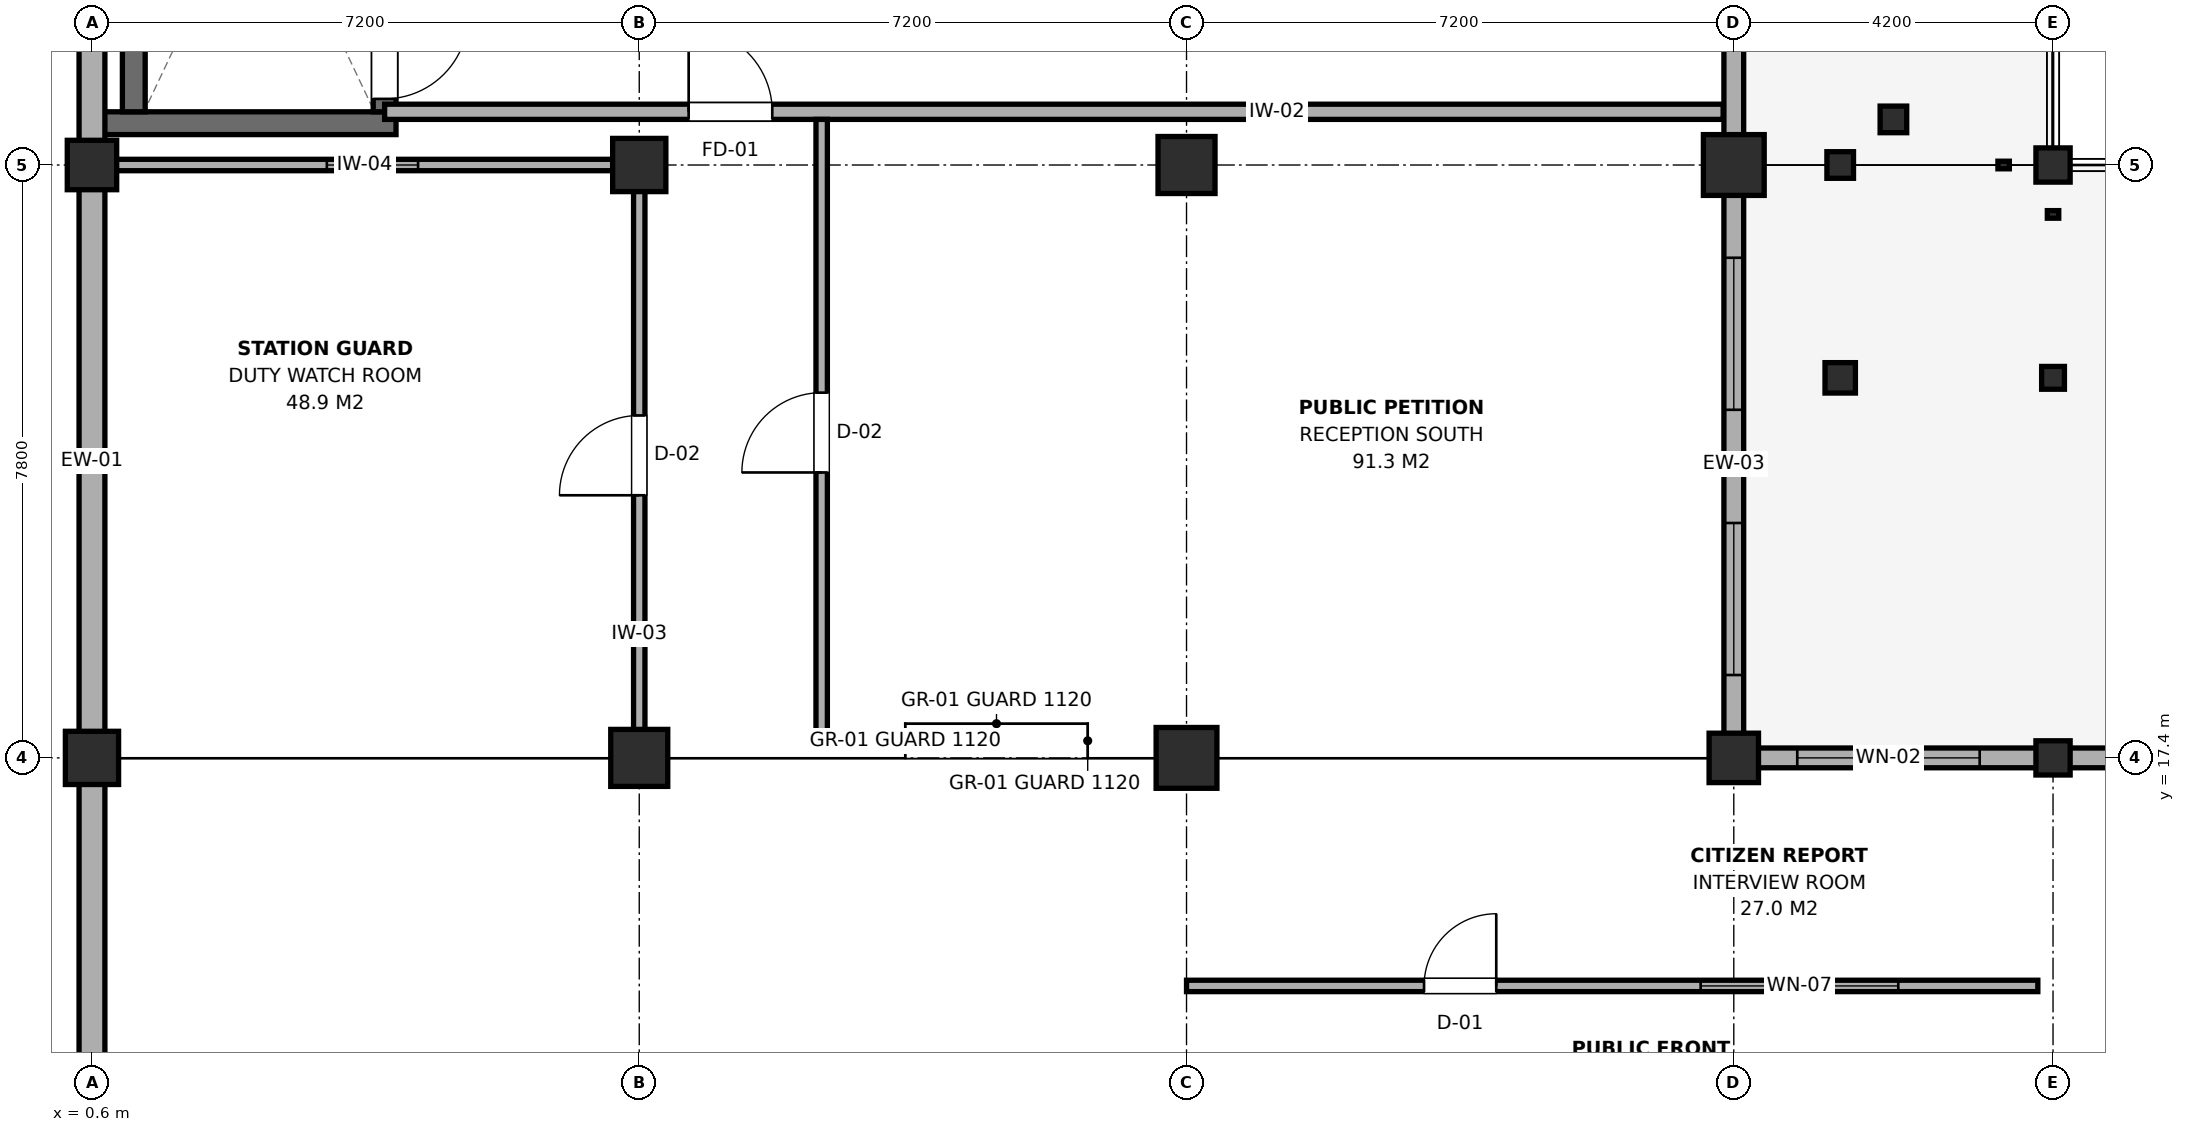
"""IFC4 building model, lengths in metres.
Left out: names, types, materials, properties, quantities, classifications, styles, units other than length and angle.
Written with IfcOpenShell. Run it as: python <this file> out.ifc"""

import sys

from ifc_helpers import new_model, si_unit, direction, frame, frame_2d, origin, origin_2d, place, context, subcontext, project, spatial, rectangle, hollow_rectangle, extrude, element, fill, save


model = new_model("IFC4")
c1 = context("Model", 3, precision=1e-05, world=origin(), true_north=direction((0.0, 1.0)))
c2 = subcontext(c1, "Body", "Model", "MODEL_VIEW")
j1 = project(units=[si_unit("LENGTHUNIT", "METRE"), si_unit("PLANEANGLEUNIT", "RADIAN")], contexts=[c1])
p1 = place(None, origin())
s1 = spatial("IfcSite", under=j1, at=p1, CompositionType="ELEMENT")
p2 = place(p1, origin())
s2 = spatial("IfcBuilding", under=s1, at=p2, CompositionType="ELEMENT")
p3 = place(p2, origin())
s3 = spatial("IfcBuildingStorey", under=s2, at=p3, CompositionType="ELEMENT", Elevation=0.0)
p4 = place(p3, frame((0.6, 17.4, 0.0), z_axis=(0.0, 0.0, 1.0), x_axis=(1.0, 0.0, 0.0)))
e1 = element("IfcColumn", 1, at=p4, inside=s3, PredefinedType="COLUMN", context=c2, shape_type="SweptSolid", body=[
    extrude(rectangle(XDim=0.7, YDim=0.7, at=origin_2d()), origin(), (0.0, 0.0, 1.0), 4.8),
])
p5 = place(p3, frame((0.6, 25.2, 0.0), z_axis=(0.0, 0.0, 1.0), x_axis=(1.0, 0.0, 0.0)))
e2 = element("IfcColumn", 2, at=p5, inside=s3, PredefinedType="COLUMN", context=c2, shape_type="SweptSolid", body=[
    extrude(rectangle(XDim=0.65, YDim=0.65, at=origin_2d()), origin(), (0.0, 0.0, 1.0), 4.8),
])
p6 = place(p3, frame((7.8, 17.4, 0.0), z_axis=(0.0, 0.0, 1.0), x_axis=(1.0, 0.0, 0.0)))
e3 = element("IfcColumn", 3, at=p6, inside=s3, PredefinedType="COLUMN", context=c2, shape_type="SweptSolid", body=[
    extrude(rectangle(XDim=0.75, YDim=0.75, at=origin_2d()), origin(), (0.0, 0.0, 1.0), 4.8),
])
p7 = place(p3, frame((7.8, 25.2, 0.0), z_axis=(0.0, 0.0, 1.0), x_axis=(1.0, 0.0, 0.0)))
e4 = element("IfcColumn", 4, at=p7, inside=s3, PredefinedType="COLUMN", context=c2, shape_type="SweptSolid", body=[
    extrude(rectangle(XDim=0.7, YDim=0.7, at=origin_2d()), origin(), (0.0, 0.0, 1.0), 4.8),
])
p8 = place(p3, frame((15.0, 17.4, 0.0), z_axis=(0.0, 0.0, 1.0), x_axis=(1.0, 0.0, 0.0)))
e5 = element("IfcColumn", 5, at=p8, inside=s3, PredefinedType="COLUMN", context=c2, shape_type="SweptSolid", body=[
    extrude(rectangle(XDim=0.8, YDim=0.8, at=origin_2d()), origin(), (0.0, 0.0, 1.0), 4.8),
])
p9 = place(p3, frame((15.0, 25.2, 0.0), z_axis=(0.0, 0.0, 1.0), x_axis=(1.0, 0.0, 0.0)))
e6 = element("IfcColumn", 6, at=p9, inside=s3, PredefinedType="COLUMN", context=c2, shape_type="SweptSolid", body=[
    extrude(rectangle(XDim=0.75, YDim=0.75, at=origin_2d()), origin(), (0.0, 0.0, 1.0), 4.8),
])
p10 = place(p3, frame((22.2, 17.4, 0.0), z_axis=(0.0, 0.0, 1.0), x_axis=(1.0, 0.0, 0.0)))
e7 = element("IfcColumn", 7, at=p10, inside=s3, PredefinedType="COLUMN", context=c2, shape_type="SweptSolid", body=[
    extrude(rectangle(XDim=0.65, YDim=0.65, at=origin_2d()), origin(), (0.0, 0.0, 1.0), 4.8),
])
p11 = place(p3, frame((22.2, 25.2, 0.0), z_axis=(0.0, 0.0, 1.0), x_axis=(1.0, 0.0, 0.0)))
e8 = element("IfcColumn", 8, at=p11, inside=s3, PredefinedType="COLUMN", context=c2, shape_type="SweptSolid", body=[
    extrude(rectangle(XDim=0.8, YDim=0.8, at=origin_2d()), origin(), (0.0, 0.0, 1.0), 4.8),
])
p12 = place(p3, frame((23.6, 22.4, 0.0), z_axis=(0.0, 0.0, 1.0), x_axis=(1.0, 0.0, 0.0)))
e9 = element("IfcColumn", 9, at=p12, inside=s3, PredefinedType="COLUMN", context=c2, shape_type="SweptSolid", body=[
    extrude(hollow_rectangle(XDim=0.4, YDim=0.4, WallThickness=0.02, at=origin_2d()), origin(), (0.0, 0.0, 1.0), 4.8),
])
for number, where, z_axis, x_axis in (
    (10, (23.6, 25.2, 0.0), (0.0, 0.0, 1.0), (1.0, 0.0, 0.0)),
    (11, (24.3, 25.8, 0.0), (0.0, 0.0, 1.0), (1.0, 0.0, 0.0)),
):
    element("IfcColumn", number, at=place(p3, frame(where, z_axis=z_axis, x_axis=x_axis)), inside=s3, PredefinedType="COLUMN", context=c2, shape_type="SweptSolid", body=[
        extrude(hollow_rectangle(XDim=0.35, YDim=0.35, WallThickness=0.016, at=origin_2d()), origin(), (0.0, 0.0, 1.0), 4.8),
    ])
p13 = place(p3, frame((26.4, 17.4, 0.0), z_axis=(0.0, 0.0, 1.0), x_axis=(1.0, 0.0, 0.0)))
e12 = element("IfcColumn", 12, at=p13, inside=s3, PredefinedType="COLUMN", context=c2, shape_type="SweptSolid", body=[
    extrude(rectangle(XDim=0.45, YDim=0.45, at=origin_2d()), origin(), (0.0, 0.0, 1.0), 4.8),
])
p14 = place(p3, frame((26.4, 22.4, 0.0), z_axis=(0.0, 0.0, 1.0), x_axis=(1.0, 0.0, 0.0)))
e13 = element("IfcColumn", 13, at=p14, inside=s3, PredefinedType="COLUMN", context=c2, shape_type="SweptSolid", body=[
    extrude(hollow_rectangle(XDim=0.3, YDim=0.3, WallThickness=0.016, at=origin_2d()), origin(), (0.0, 0.0, 1.0), 4.8),
])
p15 = place(p3, frame((26.4, 25.2, 0.0), z_axis=(0.0, 0.0, 1.0), x_axis=(1.0, 0.0, 0.0)))
e14 = element("IfcColumn", 14, at=p15, inside=s3, PredefinedType="COLUMN", context=c2, shape_type="SweptSolid", body=[
    extrude(rectangle(XDim=0.45, YDim=0.45, at=origin_2d()), origin(), (0.0, 0.0, 1.0), 4.8),
])
p16 = place(p3, frame((0.75, 25.75, 0.0), z_axis=(0.0, 0.0, 1.0), x_axis=(1.0, 0.0, 0.0)))
e15 = element("IfcWall", 15, at=p16, inside=s3, PredefinedType="SHEAR", context=c2, shape_type="SweptSolid", body=[
    extrude(rectangle(XDim=3.85, YDim=0.3, at=frame_2d((1.925, 0.0))), origin(), (0.0, 0.0, 1.0), 4.56),
])
p17 = place(p3, frame((1.15, 25.9, 0.0), z_axis=(0.0, 0.0, 1.0), x_axis=(0.0, 1.0, 0.0)))
e16 = element("IfcWall", 16, at=p17, inside=s3, PredefinedType="SHEAR", context=c2, shape_type="SweptSolid", body=[
    extrude(rectangle(XDim=6.4, YDim=0.3, at=frame_2d((3.2, 0.0))), origin(), (0.0, 0.0, 1.0), 4.56),
])
p18 = place(p3, frame((4.45, 25.9, 0.0), z_axis=(0.0, 0.0, 1.0), x_axis=(0.0, 1.0, 0.0)))
e17 = element("IfcWall", 17, at=p18, inside=s3, PredefinedType="SHEAR", context=c2, shape_type="SweptSolid", body=[
    extrude(rectangle(XDim=6.4, YDim=0.3, at=frame_2d((3.2, 0.0))), origin(), (0.0, 0.0, 1.0), 4.56),
])
p19 = place(p18, frame((0.17, 0.0, 0.0)))
e18 = element("IfcOpeningElement", 18, at=p19, cuts=e17, PredefinedType="OPENING", context=c2, shape_type="SweptSolid", body=[
    extrude(rectangle(XDim=1.1, YDim=2.15, at=frame_2d((0.55, 1.075))), frame((0.0, 0.165, 0.0), z_axis=(0.0, -1.0, 0.0), x_axis=(1.0, 0.0, 0.0)), (0.0, 0.0, 1.0), 0.33),
])
p20 = place(p3, frame((22.07, 17.4, 0.0), z_axis=(0.0, 0.0, 1.0), x_axis=(1.0, 0.0, 0.0)))
e19 = element("IfcWall", 19, at=p20, inside=s3, PredefinedType="SOLIDWALL", context=c2, shape_type="SweptSolid", body=[
    extrude(rectangle(XDim=4.33, YDim=0.26, at=frame_2d((2.165, 0.0))), origin(), (0.0, 0.0, 1.0), 3.955),
])
p21 = place(p20, frame((0.965, 0.0, 0.9)))
e20 = element("IfcOpeningElement", 20, at=p21, cuts=e19, PredefinedType="OPENING", context=c2, shape_type="SweptSolid", body=[
    extrude(rectangle(XDim=2.4, YDim=2.1, at=frame_2d((1.2, 1.05))), frame((0.0, 0.145, 0.0), z_axis=(0.0, -1.0, 0.0), x_axis=(1.0, 0.0, 0.0)), (0.0, 0.0, 1.0), 0.29),
])
p22 = place(p3, frame((26.4, 17.4, 0.0), z_axis=(0.0, 0.0, 1.0), x_axis=(1.0, 0.0, 0.0)))
e21 = element("IfcWall", 21, at=p22, inside=s3, PredefinedType="SOLIDWALL", context=c2, shape_type="SweptSolid", body=[
    extrude(rectangle(XDim=7.8, YDim=0.26, at=frame_2d((3.9, 0.0))), origin(), (0.0, 0.0, 1.0), 3.955),
])
p23 = place(p22, frame((1.184, 0.0, 0.9)))
e22 = element("IfcOpeningElement", 22, at=p23, cuts=e21, PredefinedType="OPENING", context=c2, shape_type="SweptSolid", body=[
    extrude(rectangle(XDim=2.0, YDim=1.8, at=frame_2d((1.0, 0.9))), frame((0.0, 0.145, 0.0), z_axis=(0.0, -1.0, 0.0), x_axis=(1.0, 0.0, 0.0)), (0.0, 0.0, 1.0), 0.29),
])
p24 = place(p22, frame((4.616, 0.0, 0.9)))
e23 = element("IfcOpeningElement", 23, at=p24, cuts=e21, PredefinedType="OPENING", context=c2, shape_type="SweptSolid", body=[
    extrude(rectangle(XDim=2.0, YDim=1.8, at=frame_2d((1.0, 0.9))), frame((0.0, 0.145, 0.0), z_axis=(0.0, -1.0, 0.0), x_axis=(1.0, 0.0, 0.0)), (0.0, 0.0, 1.0), 0.29),
])
p25 = place(p3, frame((0.6, 12.0, 0.0), z_axis=(0.0, 0.0, 1.0), x_axis=(0.0, 1.0, 0.0)))
e24 = element("IfcWall", 24, at=p25, inside=s3, PredefinedType="SOLIDWALL", context=c2, shape_type="SweptSolid", body=[
    extrude(rectangle(XDim=5.57, YDim=0.34, at=frame_2d((2.785, 0.0))), origin(), (0.0, 0.0, 1.0), 3.955),
])
p26 = place(p3, frame((0.6, 17.23, 0.0), z_axis=(0.0, 0.0, 1.0), x_axis=(0.0, 1.0, 0.0)))
e25 = element("IfcWall", 25, at=p26, inside=s3, PredefinedType="SOLIDWALL", context=c2, shape_type="SweptSolid", body=[
    extrude(rectangle(XDim=7.97, YDim=0.34, at=frame_2d((3.985, 0.0))), origin(), (0.0, 0.0, 1.0), 3.955),
])
p27 = place(p3, frame((0.6, 25.2, 0.0), z_axis=(0.0, 0.0, 1.0), x_axis=(0.0, 1.0, 0.0)))
e26 = element("IfcWall", 26, at=p27, inside=s3, PredefinedType="SOLIDWALL", context=c2, shape_type="SweptSolid", body=[
    extrude(rectangle(XDim=5.6, YDim=0.34, at=frame_2d((2.8, 0.0))), origin(), (0.0, 0.0, 1.0), 4.005),
])
p28 = place(p3, frame((22.2, 17.27, 0.0), z_axis=(0.0, 0.0, 1.0), x_axis=(0.0, 1.0, 0.0)))
e27 = element("IfcWall", 27, at=p28, inside=s3, PredefinedType="SOLIDWALL", context=c2, shape_type="SweptSolid", body=[
    extrude(rectangle(XDim=7.93, YDim=0.26, at=frame_2d((3.965, 0.0))), origin(), (0.0, 0.0, 1.0), 3.955),
])
p29 = place(p28, frame((1.22, 0.0, 0.9)))
e28 = element("IfcOpeningElement", 28, at=p29, cuts=e27, PredefinedType="OPENING", context=c2, shape_type="SweptSolid", body=[
    extrude(rectangle(XDim=2.0, YDim=1.8, at=frame_2d((1.0, 0.9))), frame((0.0, 0.145, 0.0), z_axis=(0.0, -1.0, 0.0), x_axis=(1.0, 0.0, 0.0)), (0.0, 0.0, 1.0), 0.29),
])
p30 = place(p28, frame((4.71, 0.0, 0.9)))
e29 = element("IfcOpeningElement", 29, at=p30, cuts=e27, PredefinedType="OPENING", context=c2, shape_type="SweptSolid", body=[
    extrude(rectangle(XDim=2.0, YDim=1.8, at=frame_2d((1.0, 0.9))), frame((0.0, 0.145, 0.0), z_axis=(0.0, -1.0, 0.0), x_axis=(1.0, 0.0, 0.0)), (0.0, 0.0, 1.0), 0.29),
])
p31 = place(p3, frame((22.2, 25.2, 0.0), z_axis=(0.0, 0.0, 1.0), x_axis=(0.0, 1.0, 0.0)))
e30 = element("IfcWall", 30, at=p31, inside=s3, PredefinedType="SOLIDWALL", context=c2, shape_type="SweptSolid", body=[
    extrude(rectangle(XDim=5.6, YDim=0.26, at=frame_2d((2.8, 0.0))), origin(), (0.0, 0.0, 1.0), 4.005),
])
p32 = place(p31, frame((1.8, 0.0, 0.0)))
e31 = element("IfcOpeningElement", 31, at=p32, cuts=e30, PredefinedType="OPENING", context=c2, shape_type="SweptSolid", body=[
    extrude(rectangle(XDim=2.0, YDim=2.25, at=frame_2d((1.0, 1.125))), frame((0.0, 0.145, 0.0), z_axis=(0.0, -1.0, 0.0), x_axis=(1.0, 0.0, 0.0)), (0.0, 0.0, 1.0), 0.29),
])
for number, where, z_axis, x_axis in (
    (32, (26.4, 24.55, 0.0), (0.0, 0.0, 1.0), (1.0, 0.0, 0.0)),
    (33, (25.75, 25.2, 0.0), (0.0, 0.0, 1.0), (1.0, 0.0, 0.0)),
):
    element("IfcColumn", number, at=place(p3, frame(where, z_axis=z_axis, x_axis=x_axis)), inside=s3, PredefinedType="COLUMN", context=c2, shape_type="SweptSolid", body=[
        extrude(hollow_rectangle(XDim=0.15, YDim=0.1, WallThickness=0.008, at=origin_2d()), origin(), (0.0, 0.0, 1.0), 4.8),
    ])
p33 = place(p3, frame((4.45, 25.9, 0.0), z_axis=(0.0, 0.0, 1.0), x_axis=(1.0, 0.0, 0.0)))
e34 = element("IfcWall", 34, at=p33, inside=s3, PredefinedType="PARTITIONING", context=c2, shape_type="SweptSolid", body=[
    extrude(rectangle(XDim=17.61, YDim=0.2, at=frame_2d((8.805, 0.0))), origin(), (0.0, 0.0, 1.0), 4.005),
])
p34 = place(p33, frame((4.0, 0.0, 0.0)))
e35 = element("IfcOpeningElement", 35, at=p34, cuts=e34, PredefinedType="OPENING", context=c2, shape_type="SweptSolid", body=[
    extrude(rectangle(XDim=1.1, YDim=2.15, at=frame_2d((0.55, 1.075))), frame((0.0, 0.115, 0.0), z_axis=(0.0, -1.0, 0.0), x_axis=(1.0, 0.0, 0.0)), (0.0, 0.0, 1.0), 0.23),
])
p35 = place(p3, frame((15.0, 14.4, 0.0), z_axis=(0.0, 0.0, 1.0), x_axis=(1.0, 0.0, 0.0)))
e36 = element("IfcWall", 36, at=p35, inside=s3, PredefinedType="PARTITIONING", context=c2, shape_type="SweptSolid", body=[
    extrude(rectangle(XDim=11.2, YDim=0.15, at=frame_2d((5.6, 0.0))), origin(), (0.0, 0.0, 1.0), 4.055),
])
p36 = place(p35, frame((3.125, 0.0, 0.0)))
e37 = element("IfcOpeningElement", 37, at=p36, cuts=e36, PredefinedType="OPENING", context=c2, shape_type="SweptSolid", body=[
    extrude(rectangle(XDim=0.95, YDim=2.15, at=frame_2d((0.475, 1.075))), frame((0.0, 0.09, 0.0), z_axis=(0.0, -1.0, 0.0), x_axis=(1.0, 0.0, 0.0)), (0.0, 0.0, 1.0), 0.18),
])
p37 = place(p35, frame((6.764, 0.0, 0.95)))
e38 = element("IfcOpeningElement", 38, at=p37, cuts=e36, PredefinedType="OPENING", context=c2, shape_type="SweptSolid", body=[
    extrude(rectangle(XDim=2.6, YDim=1.5, at=frame_2d((1.3, 0.75))), frame((0.0, 0.09, 0.0), z_axis=(0.0, -1.0, 0.0), x_axis=(1.0, 0.0, 0.0)), (0.0, 0.0, 1.0), 0.18),
])
p38 = place(p3, frame((7.8, 17.56, 0.0), z_axis=(0.0, 0.0, 1.0), x_axis=(0.0, 1.0, 0.0)))
e39 = element("IfcWall", 39, at=p38, inside=s3, PredefinedType="PARTITIONING", context=c2, shape_type="SweptSolid", body=[
    extrude(rectangle(XDim=7.64, YDim=0.15, at=frame_2d((3.82, 0.0))), origin(), (0.0, 0.0, 1.0), 3.955),
])
p39 = place(p38, frame((3.295, 0.0, 0.0)))
e40 = element("IfcOpeningElement", 40, at=p39, cuts=e39, PredefinedType="OPENING", context=c2, shape_type="SweptSolid", body=[
    extrude(rectangle(XDim=1.05, YDim=2.15, at=frame_2d((0.525, 1.075))), frame((0.0, 0.09, 0.0), z_axis=(0.0, -1.0, 0.0), x_axis=(1.0, 0.0, 0.0)), (0.0, 0.0, 1.0), 0.18),
])
p40 = place(p3, frame((0.78, 25.2, 0.0), z_axis=(0.0, 0.0, 1.0), x_axis=(1.0, 0.0, 0.0)))
e41 = element("IfcWall", 41, at=p40, inside=s3, PredefinedType="PARTITIONING", context=c2, shape_type="SweptSolid", body=[
    extrude(rectangle(XDim=7.02, YDim=0.15, at=frame_2d((3.51, 0.0))), origin(), (0.0, 0.0, 1.0), 3.955),
])
p41 = place(p40, frame((2.91, 0.0, 0.95)))
e42 = element("IfcOpeningElement", 42, at=p41, cuts=e41, PredefinedType="OPENING", context=c2, shape_type="SweptSolid", body=[
    extrude(rectangle(XDim=1.2, YDim=1.5, at=frame_2d((0.6, 0.75))), frame((0.0, 0.09, 0.0), z_axis=(0.0, -1.0, 0.0), x_axis=(1.0, 0.0, 0.0)), (0.0, 0.0, 1.0), 0.18),
])
p42 = place(p3, frame((10.2, 17.56, 0.0), z_axis=(0.0, 0.0, 1.0), x_axis=(0.0, 1.0, 0.0)))
e43 = element("IfcWall", 43, at=p42, inside=s3, PredefinedType="PARTITIONING", context=c2, shape_type="SweptSolid", body=[
    extrude(rectangle(XDim=8.24, YDim=0.15, at=frame_2d((4.12, 0.0))), origin(), (0.0, 0.0, 1.0), 4.005),
])
p43 = place(p42, frame((3.595, 0.0, 0.0)))
e44 = element("IfcOpeningElement", 44, at=p43, cuts=e43, PredefinedType="OPENING", context=c2, shape_type="SweptSolid", body=[
    extrude(rectangle(XDim=1.05, YDim=2.15, at=frame_2d((0.525, 1.075))), frame((0.0, 0.09, 0.0), z_axis=(0.0, -1.0, 0.0), x_axis=(1.0, 0.0, 0.0)), (0.0, 0.0, 1.0), 0.18),
])
p44 = place(p21, origin())
e45 = element("IfcWindow", 45, at=p44, inside=s3, PartitioningType="SINGLE_PANEL", PredefinedType="WINDOW", context=c2, shape_type="SweptSolid", body=[
    extrude(rectangle(XDim=2.4, YDim=2.1, at=frame_2d((1.2, 1.05))), frame((0.0, 0.03, 0.0), z_axis=(0.0, -1.0, 0.0), x_axis=(1.0, 0.0, 0.0)), (0.0, 0.0, 1.0), 0.06),
])
fill(e20, e45)
p45 = place(p29, origin())
e46 = element("IfcWindow", 46, at=p45, inside=s3, PartitioningType="SINGLE_PANEL", PredefinedType="WINDOW", context=c2, shape_type="SweptSolid", body=[
    extrude(rectangle(XDim=2.0, YDim=1.8, at=frame_2d((1.0, 0.9))), frame((0.0, 0.03, 0.0), z_axis=(0.0, -1.0, 0.0), x_axis=(1.0, 0.0, 0.0)), (0.0, 0.0, 1.0), 0.06),
])
fill(e28, e46)
p46 = place(p30, origin())
e47 = element("IfcWindow", 47, at=p46, inside=s3, PartitioningType="SINGLE_PANEL", PredefinedType="WINDOW", context=c2, shape_type="SweptSolid", body=[
    extrude(rectangle(XDim=2.0, YDim=1.8, at=frame_2d((1.0, 0.9))), frame((0.0, 0.03, 0.0), z_axis=(0.0, -1.0, 0.0), x_axis=(1.0, 0.0, 0.0)), (0.0, 0.0, 1.0), 0.06),
])
fill(e29, e47)
p47 = place(p19, frame((1.1, 0.0, 0.0), z_axis=(0.0, 0.0, 1.0), x_axis=(-1.0, 0.0, 0.0)))
e48 = element("IfcDoor", 48, at=p47, inside=s3, OperationType="SINGLE_SWING_LEFT", PredefinedType="DOOR", context=c2, shape_type="SweptSolid", body=[
    extrude(rectangle(XDim=1.1, YDim=2.15, at=frame_2d((0.55, 1.075))), frame((0.0, 0.025, 0.0), z_axis=(0.0, -1.0, 0.0), x_axis=(1.0, 0.0, 0.0)), (0.0, 0.0, 1.0), 0.05),
])
fill(e18, e48)
p48 = place(p34, origin())
e49 = element("IfcDoor", 49, at=p48, inside=s3, OperationType="SINGLE_SWING_LEFT", PredefinedType="DOOR", context=c2, shape_type="SweptSolid", body=[
    extrude(rectangle(XDim=1.1, YDim=2.15, at=frame_2d((0.55, 1.075))), frame((0.0, 0.025, 0.0), z_axis=(0.0, -1.0, 0.0), x_axis=(1.0, 0.0, 0.0)), (0.0, 0.0, 1.0), 0.05),
])
fill(e35, e49)
p49 = place(p36, origin())
e50 = element("IfcDoor", 50, at=p49, inside=s3, OperationType="SINGLE_SWING_RIGHT", PredefinedType="DOOR", context=c2, shape_type="SweptSolid", body=[
    extrude(rectangle(XDim=0.95, YDim=2.15, at=frame_2d((0.475, 1.075))), frame((0.0, 0.025, 0.0), z_axis=(0.0, -1.0, 0.0), x_axis=(1.0, 0.0, 0.0)), (0.0, 0.0, 1.0), 0.05),
])
fill(e37, e50)
p50 = place(p37, origin())
e51 = element("IfcWindow", 51, at=p50, inside=s3, PartitioningType="SINGLE_PANEL", PredefinedType="WINDOW", context=c2, shape_type="SweptSolid", body=[
    extrude(rectangle(XDim=2.6, YDim=1.5, at=frame_2d((1.3, 0.75))), frame((0.0, 0.03, 0.0), z_axis=(0.0, -1.0, 0.0), x_axis=(1.0, 0.0, 0.0)), (0.0, 0.0, 1.0), 0.06),
])
fill(e38, e51)
p51 = place(p39, origin())
e52 = element("IfcDoor", 52, at=p51, inside=s3, OperationType="SINGLE_SWING_LEFT", PredefinedType="DOOR", context=c2, shape_type="SweptSolid", body=[
    extrude(rectangle(XDim=1.05, YDim=2.15, at=frame_2d((0.525, 1.075))), frame((0.0, 0.025, 0.0), z_axis=(0.0, -1.0, 0.0), x_axis=(1.0, 0.0, 0.0)), (0.0, 0.0, 1.0), 0.05),
])
fill(e40, e52)
p52 = place(p41, origin())
e53 = element("IfcWindow", 53, at=p52, inside=s3, PartitioningType="SINGLE_PANEL", PredefinedType="WINDOW", context=c2, shape_type="SweptSolid", body=[
    extrude(rectangle(XDim=1.2, YDim=1.5, at=frame_2d((0.6, 0.75))), frame((0.0, 0.03, 0.0), z_axis=(0.0, -1.0, 0.0), x_axis=(1.0, 0.0, 0.0)), (0.0, 0.0, 1.0), 0.06),
])
fill(e42, e53)
p53 = place(p43, origin())
e54 = element("IfcDoor", 54, at=p53, inside=s3, OperationType="SINGLE_SWING_LEFT", PredefinedType="DOOR", context=c2, shape_type="SweptSolid", body=[
    extrude(rectangle(XDim=1.05, YDim=2.15, at=frame_2d((0.525, 1.075))), frame((0.0, 0.025, 0.0), z_axis=(0.0, -1.0, 0.0), x_axis=(1.0, 0.0, 0.0)), (0.0, 0.0, 1.0), 0.05),
])
fill(e44, e54)
save(model, sys.argv[1])
